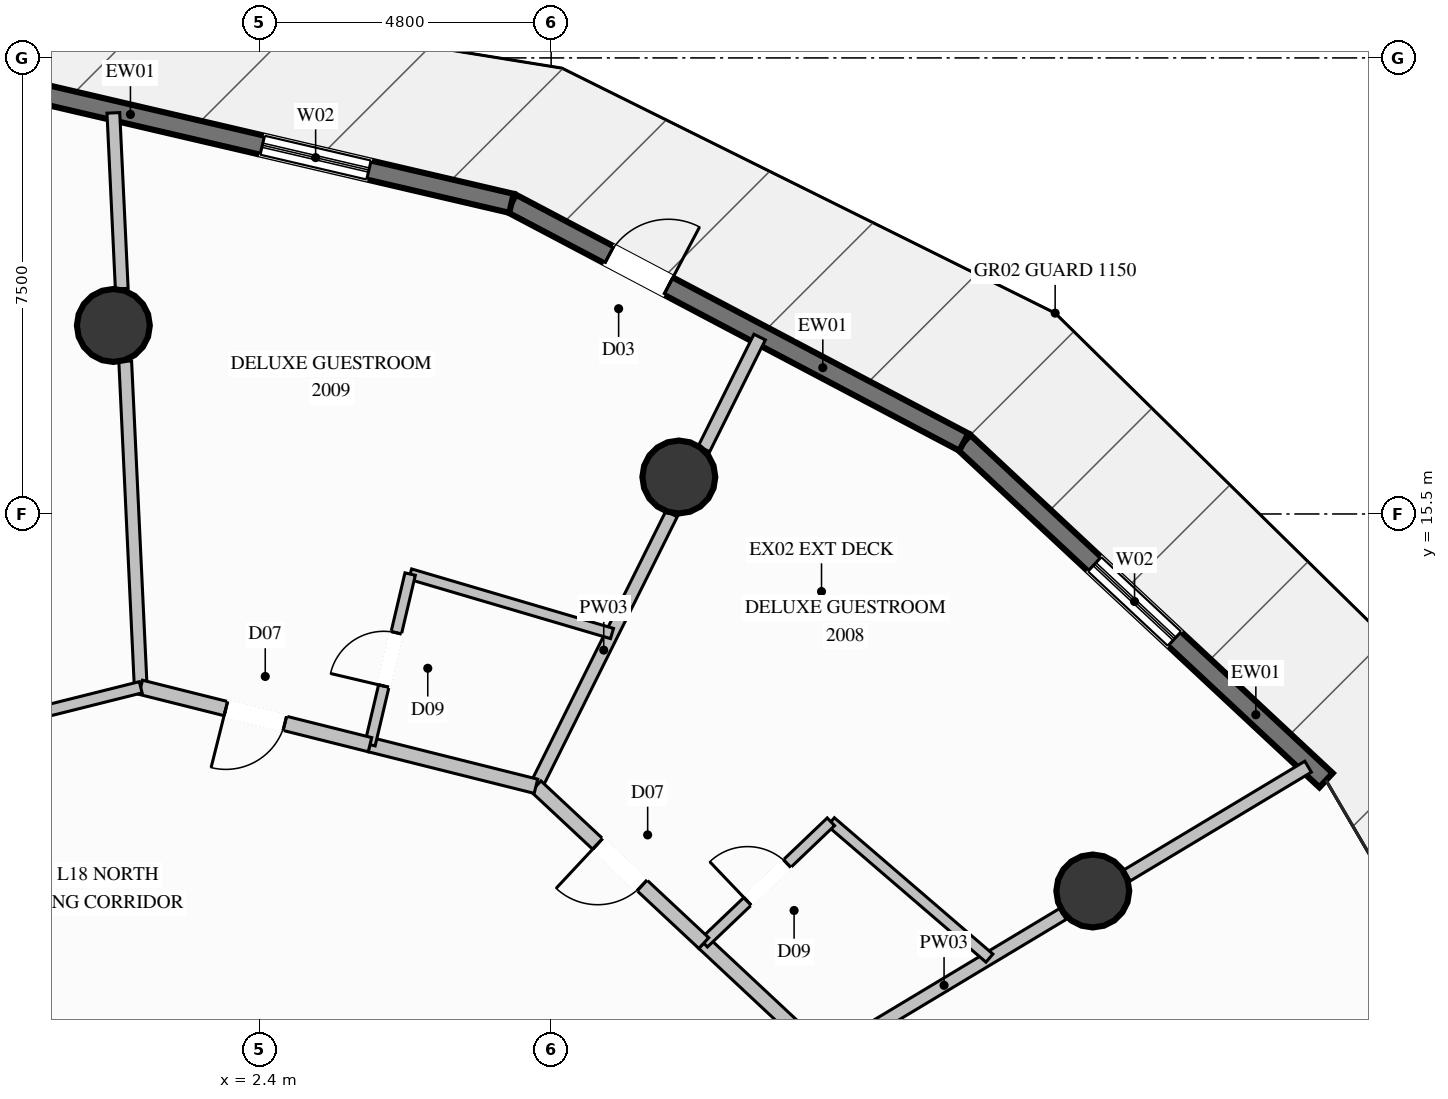
"""IFC4 building model, lengths in metres.
Left out: names, types, materials, properties, quantities, classifications, styles, units other than length and angle.
Written with IfcOpenShell. Run it as: python <this file> out.ifc"""

import sys

from ifc_helpers import new_model, si_unit, direction, frame, frame_2d, origin, origin_2d, place, context, subcontext, project, spatial, rectangle, circle, extrude, element, fill, save


model = new_model("IFC4")
c1 = context("Model", 3, precision=1e-05, world=origin(), true_north=direction((0.0, 1.0)))
c2 = subcontext(c1, "Body", "Model", "MODEL_VIEW")
j1 = project(units=[si_unit("LENGTHUNIT", "METRE"), si_unit("PLANEANGLEUNIT", "RADIAN")], contexts=[c1])
p1 = place(None, origin())
s1 = spatial("IfcSite", under=j1, at=p1, CompositionType="ELEMENT")
p2 = place(p1, origin())
s2 = spatial("IfcBuilding", under=s1, at=p2, CompositionType="ELEMENT")
p3 = place(p2, frame((0.0, 0.0, 75.2)))
s3 = spatial("IfcBuildingStorey", under=s2, at=p3, CompositionType="ELEMENT", Elevation=75.2)
for number, where, z_axis, x_axis in (
    (1, (16.108, 9.3, 0.0), (0.0, 0.0, 1.0), (1.0, 0.0, 0.0)),
    (2, (9.3, 16.108, 0.0), (0.0, 0.0, 1.0), (1.0, 0.0, 0.0)),
    (3, (0.0, 18.6, 0.0), (0.0, 0.0, 1.0), (1.0, 0.0, 0.0)),
):
    element("IfcColumn", number, at=place(p3, frame(where, z_axis=z_axis, x_axis=x_axis)), inside=s3, PredefinedType="COLUMN", context=c2, shape_type="SweptSolid", body=[
        extrude(circle(Radius=0.6, at=origin_2d()), origin(), (0.0, 0.0, 1.0), 3.6),
    ])
p4 = place(p3, frame((13.987, 16.682, 0.0), z_axis=(0.0, 0.0, 1.0), x_axis=(0.73100047145, -0.682376956484, 0.0)))
e4 = element("IfcWall", 4, at=p4, inside=s3, PredefinedType="SOLIDWALL", context=c2, shape_type="SweptSolid", body=[
    extrude(rectangle(XDim=8.149, YDim=0.32, at=frame_2d((4.075, 0.0))), origin(), (0.0, 0.0, 1.0), 3.34),
])
p5 = place(p4, frame((2.941, 0.0, 0.35)))
e5 = element("IfcOpeningElement", 5, at=p5, cuts=e4, PredefinedType="OPENING", context=c2, shape_type="SweptSolid", body=[
    extrude(rectangle(XDim=1.8, YDim=2.6, at=frame_2d((0.9, 1.3))), frame((0.0, 0.17, 0.0), z_axis=(0.0, -1.0, 0.0), x_axis=(1.0, 0.0, 0.0)), (0.0, 0.0, 1.0), 0.34),
])
p6 = place(p3, frame((6.547, 20.609, 0.0), z_axis=(0.0, 0.0, 1.0), x_axis=(0.88436678303, -0.466792666044, 0.0)))
e6 = element("IfcWall", 6, at=p6, inside=s3, PredefinedType="SOLIDWALL", context=c2, shape_type="SweptSolid", body=[
    extrude(rectangle(XDim=8.413, YDim=0.32, at=frame_2d((4.207, 0.0))), origin(), (0.0, 0.0, 1.0), 3.34),
])
p7 = place(p6, frame((1.818, 0.0, 0.0)))
e7 = element("IfcOpeningElement", 7, at=p7, cuts=e6, PredefinedType="OPENING", context=c2, shape_type="SweptSolid", body=[
    extrude(rectangle(XDim=1.1, YDim=2.2, at=frame_2d((0.55, 1.1))), frame((0.0, 0.17, 0.0), z_axis=(0.0, -1.0, 0.0), x_axis=(1.0, 0.0, 0.0)), (0.0, 0.0, 1.0), 0.34),
])
p8 = place(p3, frame((-1.645, 22.52, 0.0), z_axis=(0.0, 0.0, 1.0), x_axis=(0.973850842265, -0.227188329407, 0.0)))
e8 = element("IfcWall", 8, at=p8, inside=s3, PredefinedType="SOLIDWALL", context=c2, shape_type="SweptSolid", body=[
    extrude(rectangle(XDim=8.412, YDim=0.32, at=frame_2d((4.206, 0.0))), origin(), (0.0, 0.0, 1.0), 3.34),
])
p9 = place(p8, frame((4.205, 0.0, 0.35)))
e9 = element("IfcOpeningElement", 9, at=p9, cuts=e8, PredefinedType="OPENING", context=c2, shape_type="SweptSolid", body=[
    extrude(rectangle(XDim=1.8, YDim=2.6, at=frame_2d((0.9, 1.3))), frame((0.0, 0.17, 0.0), z_axis=(0.0, -1.0, 0.0), x_axis=(1.0, 0.0, 0.0)), (0.0, 0.0, 1.0), 0.34),
])
p10 = place(p3, frame((11.708, 6.575, 0.0), z_axis=(0.0, 0.0, 1.0), x_axis=(0.857261290525, 0.514881617236, 0.0)))
e10 = element("IfcWall", 10, at=p10, inside=s3, PredefinedType="PARTITIONING", context=c2, shape_type="SweptSolid", body=[
    extrude(rectangle(XDim=4.559, YDim=0.21, at=frame_2d((2.279, 0.0))), origin(), (0.0, 0.0, 1.0), 2.709),
])
p11 = place(p3, frame((16.672, 9.556, 0.0), z_axis=(0.0, 0.0, 1.0), x_axis=(0.857238479405, 0.514919595109, 0.0)))
e11 = element("IfcWall", 11, at=p11, inside=s3, PredefinedType="PARTITIONING", context=c2, shape_type="SweptSolid", body=[
    extrude(rectangle(XDim=3.473, YDim=0.21, at=frame_2d((1.736, 0.0))), origin(), (0.0, 0.0, 1.0), 3.34),
])
p12 = place(p3, frame((6.95, 11.022, 0.0), z_axis=(0.0, 0.0, 1.0), x_axis=(0.445768437474, 0.895148311819, 0.0)))
e12 = element("IfcWall", 12, at=p12, inside=s3, PredefinedType="PARTITIONING", context=c2, shape_type="SweptSolid", body=[
    extrude(rectangle(XDim=5.002, YDim=0.21, at=frame_2d((2.501, 0.0))), origin(), (0.0, 0.0, 1.0), 2.709),
])
p13 = place(p3, frame((9.713, 16.57, 0.0), z_axis=(0.0, 0.0, 1.0), x_axis=(0.44588210897, 0.895091696365, 0.0)))
e13 = element("IfcWall", 13, at=p13, inside=s3, PredefinedType="PARTITIONING", context=c2, shape_type="SweptSolid", body=[
    extrude(rectangle(XDim=2.054, YDim=0.21, at=frame_2d((1.027, 0.0))), origin(), (0.0, 0.0, 1.0), 3.34),
])
p14 = place(p3, frame((0.45, 12.65, 0.0), z_axis=(0.0, 0.0, 1.0), x_axis=(-0.047489507413, 0.998871736854, 0.0)))
e14 = element("IfcWall", 14, at=p14, inside=s3, PredefinedType="PARTITIONING", context=c2, shape_type="SweptSolid", body=[
    extrude(rectangle(XDim=5.367, YDim=0.21, at=frame_2d((2.684, 0.0))), origin(), (0.0, 0.0, 1.0), 2.709),
])
p15 = place(p3, frame((0.138, 19.205, 0.0), z_axis=(0.0, 0.0, 1.0), x_axis=(-0.047661338337, 0.998863552658, 0.0)))
e15 = element("IfcWall", 15, at=p15, inside=s3, PredefinedType="PARTITIONING", context=c2, shape_type="SweptSolid", body=[
    extrude(rectangle(XDim=2.894, YDim=0.21, at=frame_2d((1.447, 0.0))), origin(), (0.0, 0.0, 1.0), 3.34),
])
p16 = place(p3, frame((11.708, 6.575, 0.0), z_axis=(0.0, 0.0, 1.0), x_axis=(-0.730449499178, 0.682966711597, 0.0)))
e16 = element("IfcWall", 16, at=p16, inside=s3, PredefinedType="PARTITIONING", context=c2, shape_type="SweptSolid", body=[
    extrude(rectangle(XDim=2.735, YDim=0.24, at=frame_2d((1.368, 0.0))), origin(), (0.0, 0.0, 1.0), 3.34),
])
p17 = place(p3, frame((14.408, 8.196, 0.0), z_axis=(0.0, 0.0, 1.0), x_axis=(-0.758188004492, 0.652036003488, 0.0)))
e17 = element("IfcWall", 17, at=p17, inside=s3, PredefinedType="PLUMBINGWALL", context=c2, shape_type="SweptSolid", body=[
    extrude(rectangle(XDim=3.438, YDim=0.175, at=frame_2d((1.719, 0.0))), origin(), (0.0, 0.0, 1.0), 3.34),
])
p18 = place(p3, frame((9.71, 8.443, 0.0), z_axis=(0.0, 0.0, 1.0), x_axis=(0.723553055792, 0.690268770447, 0.0)))
e18 = element("IfcWall", 18, at=p18, inside=s3, PredefinedType="PLUMBINGWALL", context=c2, shape_type="SweptSolid", body=[
    extrude(rectangle(XDim=2.89, YDim=0.175, at=frame_2d((1.445, 0.0))), origin(), (0.0, 0.0, 1.0), 3.34),
])
p19 = place(p18, frame((0.995, 0.0, 0.0)))
e19 = element("IfcOpeningElement", 19, at=p19, cuts=e18, PredefinedType="OPENING", context=c2, shape_type="SweptSolid", body=[
    extrude(rectangle(XDim=0.9, YDim=2.1, at=frame_2d((0.45, 1.05))), frame((0.0, 0.098, 0.0), z_axis=(0.0, -1.0, 0.0), x_axis=(1.0, 0.0, 0.0)), (0.0, 0.0, 1.0), 0.195),
])
p20 = place(p3, frame((9.71, 8.443, 0.0), z_axis=(0.0, 0.0, 1.0), x_axis=(-0.730679025356, 0.682721145054, 0.0)))
e20 = element("IfcWall", 20, at=p20, inside=s3, PredefinedType="PARTITIONING", context=c2, shape_type="SweptSolid", body=[
    extrude(rectangle(XDim=3.777, YDim=0.24, at=frame_2d((1.889, 0.0))), origin(), (0.0, 0.0, 1.0), 3.34),
])
p21 = place(p20, frame((1.389, 0.0, 0.0)))
e21 = element("IfcOpeningElement", 21, at=p21, cuts=e20, PredefinedType="OPENING", context=c2, shape_type="SweptSolid", body=[
    extrude(rectangle(XDim=1.0, YDim=2.2, at=frame_2d((0.5, 1.1))), frame((0.0, 0.13, 0.0), z_axis=(0.0, -1.0, 0.0), x_axis=(1.0, 0.0, 0.0)), (0.0, 0.0, 1.0), 0.26),
])
p22 = place(p3, frame((6.95, 11.022, 0.0), z_axis=(0.0, 0.0, 1.0), x_axis=(-0.970009682466, 0.243066278865, 0.0)))
e22 = element("IfcWall", 22, at=p22, inside=s3, PredefinedType="PARTITIONING", context=c2, shape_type="SweptSolid", body=[
    extrude(rectangle(XDim=2.814, YDim=0.24, at=frame_2d((1.407, 0.0))), origin(), (0.0, 0.0, 1.0), 3.34),
])
p23 = place(p3, frame((8.201, 13.534, 0.0), z_axis=(0.0, 0.0, 1.0), x_axis=(-0.95923959758, 0.282594045294, 0.0)))
e23 = element("IfcWall", 23, at=p23, inside=s3, PredefinedType="PLUMBINGWALL", context=c2, shape_type="SweptSolid", body=[
    extrude(rectangle(XDim=3.461, YDim=0.175, at=frame_2d((1.73, 0.0))), origin(), (0.0, 0.0, 1.0), 3.34),
])
p24 = place(p3, frame((4.22, 11.706, 0.0), z_axis=(0.0, 0.0, 1.0), x_axis=(0.229341431174, 0.973346037105, 0.0)))
e24 = element("IfcWall", 24, at=p24, inside=s3, PredefinedType="PLUMBINGWALL", context=c2, shape_type="SweptSolid", body=[
    extrude(rectangle(XDim=2.883, YDim=0.175, at=frame_2d((1.441, 0.0))), origin(), (0.0, 0.0, 1.0), 3.34),
])
p25 = place(p24, frame((0.991, 0.0, 0.0)))
e25 = element("IfcOpeningElement", 25, at=p25, cuts=e24, PredefinedType="OPENING", context=c2, shape_type="SweptSolid", body=[
    extrude(rectangle(XDim=0.9, YDim=2.1, at=frame_2d((0.45, 1.05))), frame((0.0, 0.098, 0.0), z_axis=(0.0, -1.0, 0.0), x_axis=(1.0, 0.0, 0.0)), (0.0, 0.0, 1.0), 0.195),
])
p26 = place(p3, frame((4.22, 11.706, 0.0), z_axis=(0.0, 0.0, 1.0), x_axis=(-0.970061149619, 0.24286079552, 0.0)))
e26 = element("IfcWall", 26, at=p26, inside=s3, PredefinedType="PARTITIONING", context=c2, shape_type="SweptSolid", body=[
    extrude(rectangle(XDim=3.886, YDim=0.24, at=frame_2d((1.943, 0.0))), origin(), (0.0, 0.0, 1.0), 3.34),
])
p27 = place(p26, frame((1.443, 0.0, 0.0)))
e27 = element("IfcOpeningElement", 27, at=p27, cuts=e26, PredefinedType="OPENING", context=c2, shape_type="SweptSolid", body=[
    extrude(rectangle(XDim=1.0, YDim=2.2, at=frame_2d((0.5, 1.1))), frame((0.0, 0.13, 0.0), z_axis=(0.0, -1.0, 0.0), x_axis=(1.0, 0.0, 0.0)), (0.0, 0.0, 1.0), 0.26),
])
p28 = place(p3, frame((0.45, 12.65, 0.0), z_axis=(0.0, 0.0, 1.0), x_axis=(-0.970039538206, -0.242947101891, 0.0)))
e28 = element("IfcWall", 28, at=p28, inside=s3, PredefinedType="PARTITIONING", context=c2, shape_type="SweptSolid", body=[
    extrude(rectangle(XDim=6.701, YDim=0.19, at=frame_2d((3.35, 0.0))), origin(), (0.0, 0.0, 1.0), 3.34),
])
p29 = place(p28, frame((2.875, 0.0, 0.0)))
e29 = element("IfcOpeningElement", 29, at=p29, cuts=e28, PredefinedType="OPENING", context=c2, shape_type="SweptSolid", body=[
    extrude(rectangle(XDim=0.95, YDim=2.1, at=frame_2d((0.475, 1.05))), frame((0.0, 0.105, 0.0), z_axis=(0.0, -1.0, 0.0), x_axis=(1.0, 0.0, 0.0)), (0.0, 0.0, 1.0), 0.21),
])
p30 = place(p5, origin())
e30 = element("IfcWindow", 30, at=p30, inside=s3, PartitioningType="SINGLE_PANEL", PredefinedType="WINDOW", context=c2, shape_type="SweptSolid", body=[
    extrude(rectangle(XDim=1.8, YDim=2.6, at=frame_2d((0.9, 1.3))), frame((0.0, 0.03, 0.0), z_axis=(0.0, -1.0, 0.0), x_axis=(1.0, 0.0, 0.0)), (0.0, 0.0, 1.0), 0.06),
])
fill(e5, e30)
p31 = place(p7, origin())
e31 = element("IfcDoor", 31, at=p31, inside=s3, OperationType="SINGLE_SWING_RIGHT", PredefinedType="DOOR", context=c2, shape_type="SweptSolid", body=[
    extrude(rectangle(XDim=1.1, YDim=2.2, at=frame_2d((0.55, 1.1))), frame((0.0, 0.025, 0.0), z_axis=(0.0, -1.0, 0.0), x_axis=(1.0, 0.0, 0.0)), (0.0, 0.0, 1.0), 0.05),
])
fill(e7, e31)
p32 = place(p9, origin())
e32 = element("IfcWindow", 32, at=p32, inside=s3, PartitioningType="SINGLE_PANEL", PredefinedType="WINDOW", context=c2, shape_type="SweptSolid", body=[
    extrude(rectangle(XDim=1.8, YDim=2.6, at=frame_2d((0.9, 1.3))), frame((0.0, 0.03, 0.0), z_axis=(0.0, -1.0, 0.0), x_axis=(1.0, 0.0, 0.0)), (0.0, 0.0, 1.0), 0.06),
])
fill(e9, e32)
p33 = place(p19, origin())
e33 = element("IfcDoor", 33, at=p33, inside=s3, OperationType="SINGLE_SWING_LEFT", PredefinedType="DOOR", context=c2, shape_type="SweptSolid", body=[
    extrude(rectangle(XDim=0.9, YDim=2.1, at=frame_2d((0.45, 1.05))), frame((0.0, 0.025, 0.0), z_axis=(0.0, -1.0, 0.0), x_axis=(1.0, 0.0, 0.0)), (0.0, 0.0, 1.0), 0.05),
])
fill(e19, e33)
p34 = place(p21, origin())
e34 = element("IfcDoor", 34, at=p34, inside=s3, OperationType="SINGLE_SWING_RIGHT", PredefinedType="DOOR", context=c2, shape_type="SweptSolid", body=[
    extrude(rectangle(XDim=1.0, YDim=2.2, at=frame_2d((0.5, 1.1))), frame((0.0, 0.025, 0.0), z_axis=(0.0, -1.0, 0.0), x_axis=(1.0, 0.0, 0.0)), (0.0, 0.0, 1.0), 0.05),
])
fill(e21, e34)
p35 = place(p25, origin())
e35 = element("IfcDoor", 35, at=p35, inside=s3, OperationType="SINGLE_SWING_LEFT", PredefinedType="DOOR", context=c2, shape_type="SweptSolid", body=[
    extrude(rectangle(XDim=0.9, YDim=2.1, at=frame_2d((0.45, 1.05))), frame((0.0, 0.025, 0.0), z_axis=(0.0, -1.0, 0.0), x_axis=(1.0, 0.0, 0.0)), (0.0, 0.0, 1.0), 0.05),
])
fill(e25, e35)
p36 = place(p27, origin())
e36 = element("IfcDoor", 36, at=p36, inside=s3, OperationType="SINGLE_SWING_RIGHT", PredefinedType="DOOR", context=c2, shape_type="SweptSolid", body=[
    extrude(rectangle(XDim=1.0, YDim=2.2, at=frame_2d((0.5, 1.1))), frame((0.0, 0.025, 0.0), z_axis=(0.0, -1.0, 0.0), x_axis=(1.0, 0.0, 0.0)), (0.0, 0.0, 1.0), 0.05),
])
fill(e27, e36)
save(model, sys.argv[1])
